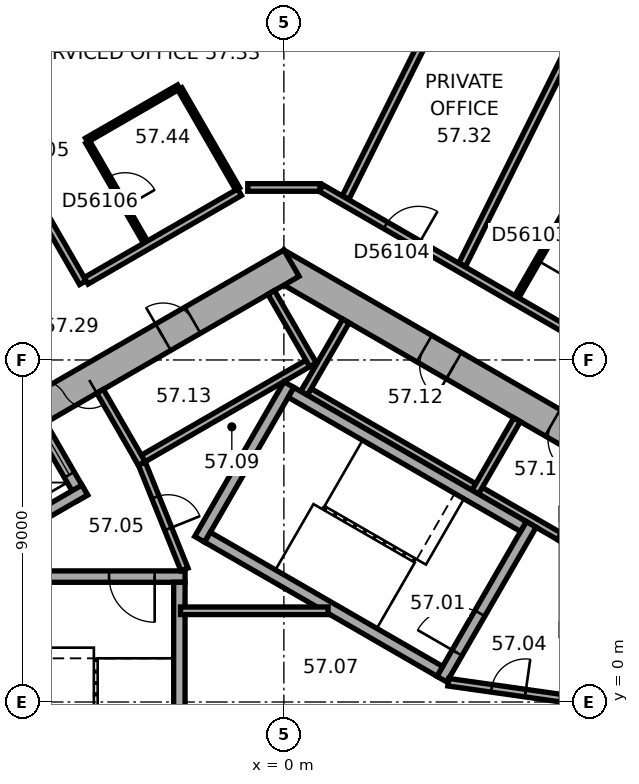
"""IFC4 building model, lengths in metres.
Left out: names, types, materials, properties, quantities, classifications, styles, units other than length and angle.
Written with IfcOpenShell. Run it as: python <this file> out.ifc"""

import sys

from ifc_helpers import new_model, si_unit, direction, frame, frame_2d, origin, place, context, subcontext, project, spatial, rectangle, extrude, element, fill, save


model = new_model("IFC4")
c1 = context("Model", 3, precision=1e-05, world=origin(), true_north=direction((0.0, 1.0)))
c2 = subcontext(c1, "Body", "Model", "MODEL_VIEW")
j1 = project(units=[si_unit("LENGTHUNIT", "METRE"), si_unit("PLANEANGLEUNIT", "RADIAN")], contexts=[c1])
p1 = place(None, origin())
s1 = spatial("IfcSite", under=j1, at=p1, CompositionType="ELEMENT")
p2 = place(p1, origin())
s2 = spatial("IfcBuilding", under=s1, at=p2, CompositionType="ELEMENT")
p3 = place(p2, frame((0.0, 0.0, 232.8)))
s3 = spatial("IfcBuildingStorey", under=s2, at=p3, CompositionType="ELEMENT", Elevation=232.8)
p4 = place(p3, frame((10.1, 5.6, 0.0), z_axis=(0.0, 0.0, 1.0), x_axis=(-0.866023897231, 0.500002609418, 0.0)))
e1 = element("IfcWall", 1, at=p4, inside=s3, PredefinedType="SHEAR", context=c2, shape_type="SweptSolid", body=[
    extrude(rectangle(XDim=11.894, YDim=0.8, at=frame_2d((5.947, 0.0))), origin(), (0.0, 0.0, 1.0), 3.7),
])
p5 = place(p4, frame((2.597, 0.0, 0.0)))
e2 = element("IfcOpeningElement", 2, at=p5, cuts=e1, PredefinedType="OPENING", context=c2, shape_type="SweptSolid", body=[
    extrude(rectangle(XDim=0.9, YDim=2.1, at=frame_2d((0.45, 1.05))), frame((0.0, 0.41, 0.0), z_axis=(0.0, -1.0, 0.0), x_axis=(1.0, 0.0, 0.0)), (0.0, 0.0, 1.0), 0.82),
])
p6 = place(p4, frame((6.497, 0.0, 0.0)))
e3 = element("IfcOpeningElement", 3, at=p6, cuts=e1, PredefinedType="OPENING", context=c2, shape_type="SweptSolid", body=[
    extrude(rectangle(XDim=0.9, YDim=2.1, at=frame_2d((0.45, 1.05))), frame((0.0, 0.41, 0.0), z_axis=(0.0, -1.0, 0.0), x_axis=(1.0, 0.0, 0.0)), (0.0, 0.0, 1.0), 0.82),
])
p7 = place(p3, frame((0.2, 11.547, 0.0), z_axis=(0.0, 0.0, 1.0), x_axis=(-0.866023897231, -0.500002609418, 0.0)))
e4 = element("IfcWall", 4, at=p7, inside=s3, PredefinedType="SHEAR", context=c2, shape_type="SweptSolid", body=[
    extrude(rectangle(XDim=11.894, YDim=0.8, at=frame_2d((5.947, 0.0))), origin(), (0.0, 0.0, 1.0), 3.7),
])
p8 = place(p7, frame((6.147, 0.0, 0.0)))
e5 = element("IfcOpeningElement", 5, at=p8, cuts=e4, PredefinedType="OPENING", context=c2, shape_type="SweptSolid", body=[
    extrude(rectangle(XDim=1.5, YDim=2.1, at=frame_2d((0.75, 1.05))), frame((0.0, 0.41, 0.0), z_axis=(0.0, -1.0, 0.0), x_axis=(1.0, 0.0, 0.0)), (0.0, 0.0, 1.0), 0.82),
])
p9 = place(p7, frame((2.997, 0.0, 0.0)))
e6 = element("IfcOpeningElement", 6, at=p9, cuts=e4, PredefinedType="OPENING", context=c2, shape_type="SweptSolid", body=[
    extrude(rectangle(XDim=0.9, YDim=2.1, at=frame_2d((0.45, 1.05))), frame((0.0, 0.41, 0.0), z_axis=(0.0, -1.0, 0.0), x_axis=(1.0, 0.0, 0.0)), (0.0, 0.0, 1.0), 0.82),
])
p10 = place(p3, frame((18.299, 13.727, 0.0), z_axis=(0.0, 0.0, 1.0), x_axis=(-0.894934554817, 0.44619742558, 0.0)))
e7 = element("IfcWall", 7, at=p10, inside=s3, PredefinedType="STANDARD", context=c2, shape_type="SweptSolid", body=[
    extrude(rectangle(XDim=18.841, YDim=0.2, at=frame_2d((9.421, 0.0))), origin(), (0.0, 0.0, 1.0), 3.7),
])
p11 = place(p10, frame((1.253, 0.0, 0.9)))
e8 = element("IfcOpeningElement", 8, at=p11, cuts=e7, PredefinedType="OPENING", context=c2, shape_type="SweptSolid", body=[
    extrude(rectangle(XDim=2.2, YDim=2.0, at=frame_2d((1.1, 1.0))), frame((0.0, 0.11, 0.0), z_axis=(0.0, -1.0, 0.0), x_axis=(1.0, 0.0, 0.0)), (0.0, 0.0, 1.0), 0.22),
])
p12 = place(p10, frame((4.786, 0.0, 0.9)))
e9 = element("IfcOpeningElement", 9, at=p12, cuts=e7, PredefinedType="OPENING", context=c2, shape_type="SweptSolid", body=[
    extrude(rectangle(XDim=2.2, YDim=2.0, at=frame_2d((1.1, 1.0))), frame((0.0, 0.11, 0.0), z_axis=(0.0, -1.0, 0.0), x_axis=(1.0, 0.0, 0.0)), (0.0, 0.0, 1.0), 0.22),
])
p13 = place(p10, frame((8.32, 0.0, 0.9)))
e10 = element("IfcOpeningElement", 10, at=p13, cuts=e7, PredefinedType="OPENING", context=c2, shape_type="SweptSolid", body=[
    extrude(rectangle(XDim=2.2, YDim=2.0, at=frame_2d((1.1, 1.0))), frame((0.0, 0.11, 0.0), z_axis=(0.0, -1.0, 0.0), x_axis=(1.0, 0.0, 0.0)), (0.0, 0.0, 1.0), 0.22),
])
p14 = place(p10, frame((11.854, 0.0, 0.9)))
e11 = element("IfcOpeningElement", 11, at=p14, cuts=e7, PredefinedType="OPENING", context=c2, shape_type="SweptSolid", body=[
    extrude(rectangle(XDim=2.2, YDim=2.0, at=frame_2d((1.1, 1.0))), frame((0.0, 0.11, 0.0), z_axis=(0.0, -1.0, 0.0), x_axis=(1.0, 0.0, 0.0)), (0.0, 0.0, 1.0), 0.22),
])
p15 = place(p10, frame((15.387, 0.0, 0.9)))
e12 = element("IfcOpeningElement", 12, at=p15, cuts=e7, PredefinedType="OPENING", context=c2, shape_type="SweptSolid", body=[
    extrude(rectangle(XDim=2.2, YDim=2.0, at=frame_2d((1.1, 1.0))), frame((0.0, 0.11, 0.0), z_axis=(0.0, -1.0, 0.0), x_axis=(1.0, 0.0, 0.0)), (0.0, 0.0, 1.0), 0.22),
])
p16 = place(p3, frame((-2.786, 22.005, 0.0), z_axis=(0.0, 0.0, 1.0), x_axis=(-0.866026555358, -0.49999800541, 0.0)))
e13 = element("IfcWall", 13, at=p16, inside=s3, PredefinedType="STANDARD", context=c2, shape_type="SweptSolid", body=[
    extrude(rectangle(XDim=18.841, YDim=0.2, at=frame_2d((9.421, 0.0))), origin(), (0.0, 0.0, 1.0), 3.7),
])
p17 = place(p16, frame((1.254, 0.0, 0.9)))
e14 = element("IfcOpeningElement", 14, at=p17, cuts=e13, PredefinedType="OPENING", context=c2, shape_type="SweptSolid", body=[
    extrude(rectangle(XDim=2.2, YDim=2.0, at=frame_2d((1.1, 1.0))), frame((0.0, 0.11, 0.0), z_axis=(0.0, -1.0, 0.0), x_axis=(1.0, 0.0, 0.0)), (0.0, 0.0, 1.0), 0.22),
])
p18 = place(p16, frame((4.788, 0.0, 0.9)))
e15 = element("IfcOpeningElement", 15, at=p18, cuts=e13, PredefinedType="OPENING", context=c2, shape_type="SweptSolid", body=[
    extrude(rectangle(XDim=2.2, YDim=2.0, at=frame_2d((1.1, 1.0))), frame((0.0, 0.11, 0.0), z_axis=(0.0, -1.0, 0.0), x_axis=(1.0, 0.0, 0.0)), (0.0, 0.0, 1.0), 0.22),
])
p19 = place(p16, frame((8.321, 0.0, 0.9)))
e16 = element("IfcOpeningElement", 16, at=p19, cuts=e13, PredefinedType="OPENING", context=c2, shape_type="SweptSolid", body=[
    extrude(rectangle(XDim=2.2, YDim=2.0, at=frame_2d((1.1, 1.0))), frame((0.0, 0.11, 0.0), z_axis=(0.0, -1.0, 0.0), x_axis=(1.0, 0.0, 0.0)), (0.0, 0.0, 1.0), 0.22),
])
p20 = place(p16, frame((11.855, 0.0, 0.9)))
e17 = element("IfcOpeningElement", 17, at=p20, cuts=e13, PredefinedType="OPENING", context=c2, shape_type="SweptSolid", body=[
    extrude(rectangle(XDim=2.2, YDim=2.0, at=frame_2d((1.1, 1.0))), frame((0.0, 0.11, 0.0), z_axis=(0.0, -1.0, 0.0), x_axis=(1.0, 0.0, 0.0)), (0.0, 0.0, 1.0), 0.22),
])
p21 = place(p16, frame((15.389, 0.0, 0.9)))
e18 = element("IfcOpeningElement", 18, at=p21, cuts=e13, PredefinedType="OPENING", context=c2, shape_type="SweptSolid", body=[
    extrude(rectangle(XDim=2.2, YDim=2.0, at=frame_2d((1.1, 1.0))), frame((0.0, 0.11, 0.0), z_axis=(0.0, -1.0, 0.0), x_axis=(1.0, 0.0, 0.0)), (0.0, 0.0, 1.0), 0.22),
])
p22 = place(p3, frame((7.424, 4.259, 0.0), z_axis=(0.0, 0.0, 1.0), x_axis=(-0.866026010844, 0.49999894854, 0.0)))
e19 = element("IfcWall", 19, at=p22, inside=s3, PredefinedType="PARTITIONING", context=c2, shape_type="SweptSolid", body=[
    extrude(rectangle(XDim=8.0, YDim=0.2, at=frame_2d((4.0, 0.0))), origin(), (0.0, 0.0, 1.0), 3.42),
])
for number, where, z_axis, x_axis in (
    (20, (7.287, 4.222, 0.0), (0.0, 0.0, 1.0), (0.5, 0.866, 0.0)),
    (21, (5.036, 5.522, 0.0), (0.0, 0.0, 1.0), (0.5, 0.866, 0.0)),
    (22, (0.532, 8.122, 0.0), (0.0, 0.0, 1.0), (0.5, 0.866, 0.0)),
):
    element("IfcWall", number, at=place(p3, frame(where, z_axis=z_axis, x_axis=x_axis)), inside=s3, PredefinedType="PARTITIONING", context=c2, shape_type="SweptSolid", body=[
        extrude(rectangle(XDim=2.2, YDim=0.2, at=frame_2d((1.1, 0.0))), origin(), (0.0, 0.0, 1.0), 3.42),
    ])
p23 = place(p3, frame((0.803, 9.009, 0.0), z_axis=(0.0, 0.0, 1.0), x_axis=(-0.866028230842, -0.499995103361, 0.0)))
e23 = element("IfcWall", 23, at=p23, inside=s3, PredefinedType="PARTITIONING", context=c2, shape_type="SweptSolid", body=[
    extrude(rectangle(XDim=5.4, YDim=0.2, at=frame_2d((2.7, 0.0))), origin(), (0.0, 0.0, 1.0), 3.42),
])
p24 = place(p3, frame((0.767, 8.872, 0.0), z_axis=(0.0, 0.0, 1.0), x_axis=(-0.499994660107, 0.866028486751, 0.0)))
e24 = element("IfcWall", 24, at=p24, inside=s3, PredefinedType="PARTITIONING", context=c2, shape_type="SweptSolid", body=[
    extrude(rectangle(XDim=2.2, YDim=0.2, at=frame_2d((1.1, 0.0))), origin(), (0.0, 0.0, 1.0), 3.42),
])
p25 = place(p3, frame((-3.737, 6.272, 0.0), z_axis=(0.0, 0.0, 1.0), x_axis=(-0.50002983664, 0.866008176907, 0.0)))
e25 = element("IfcWall", 25, at=p25, inside=s3, PredefinedType="PARTITIONING", context=c2, shape_type="SweptSolid", body=[
    extrude(rectangle(XDim=2.2, YDim=0.2, at=frame_2d((1.1, 0.0))), origin(), (0.0, 0.0, 1.0), 3.42),
])
p26 = place(p3, frame((4.158, 0.602, 0.0), z_axis=(0.0, 0.0, 1.0), x_axis=(0.499977259774, 0.866038532462, 0.0)))
e26 = element("IfcWall", 26, at=p26, inside=s3, PredefinedType="SHEAR", context=c2, shape_type="SweptSolid", body=[
    extrude(rectangle(XDim=4.7, YDim=0.3, at=frame_2d((2.35, 0.0))), origin(), (0.0, 0.0, 1.0), 3.42),
])
p27 = place(p26, frame((0.8, 0.0, 0.0)))
e27 = element("IfcOpeningElement", 27, at=p27, cuts=e26, PredefinedType="OPENING", context=c2, shape_type="SweptSolid", body=[
    extrude(rectangle(XDim=1.2, YDim=2.1, at=frame_2d((0.6, 1.05))), frame((0.0, 0.16, 0.0), z_axis=(0.0, -1.0, 0.0), x_axis=(1.0, 0.0, 0.0)), (0.0, 0.0, 1.0), 0.32),
])
p28 = place(p3, frame((-2.216, 4.282, 0.0), z_axis=(0.0, 0.0, 1.0), x_axis=(0.499977259774, 0.866038532462, 0.0)))
e28 = element("IfcWall", 28, at=p28, inside=s3, PredefinedType="SHEAR", context=c2, shape_type="SweptSolid", body=[
    extrude(rectangle(XDim=4.7, YDim=0.3, at=frame_2d((2.35, 0.0))), origin(), (0.0, 0.0, 1.0), 3.42),
])
for number, where, z_axis, x_axis in (
    (29, (4.103, 0.807, 0.0), (0.0, 0.0, 1.0), (-0.866, 0.5, 0.0)),
    (30, (6.303, 4.617, 0.0), (0.0, 0.0, 1.0), (-0.866, 0.5, 0.0)),
):
    element("IfcWall", number, at=place(p3, frame(where, z_axis=z_axis, x_axis=x_axis)), inside=s3, PredefinedType="SHEAR", context=c2, shape_type="SweptSolid", body=[
        extrude(rectangle(XDim=7.06, YDim=0.3, at=frame_2d((3.53, 0.0))), origin(), (0.0, 0.0, 1.0), 3.42),
    ])
p29 = place(p3, frame((-2.6, 3.3, 0.0), z_axis=(0.0, 0.0, 1.0), x_axis=(-1.0, 0.0, 0.0)))
e31 = element("IfcWall", 31, at=p29, inside=s3, PredefinedType="SHEAR", context=c2, shape_type="SweptSolid", body=[
    extrude(rectangle(XDim=4.7, YDim=0.3, at=frame_2d((2.35, 0.0))), origin(), (0.0, 0.0, 1.0), 3.42),
])
p30 = place(p29, frame((0.8, 0.0, 0.0)))
e32 = element("IfcOpeningElement", 32, at=p30, cuts=e31, PredefinedType="OPENING", context=c2, shape_type="SweptSolid", body=[
    extrude(rectangle(XDim=1.2, YDim=2.1, at=frame_2d((0.6, 1.05))), frame((0.0, 0.16, 0.0), z_axis=(0.0, -1.0, 0.0), x_axis=(1.0, 0.0, 0.0)), (0.0, 0.0, 1.0), 0.32),
])
p31 = place(p3, frame((-2.75, 3.15, 0.0), z_axis=(0.0, 0.0, 1.0), x_axis=(0.0, -1.0, 0.0)))
e33 = element("IfcWall", 33, at=p31, inside=s3, PredefinedType="SHEAR", context=c2, shape_type="SweptSolid", body=[
    extrude(rectangle(XDim=7.06, YDim=0.3, at=frame_2d((3.53, 0.0))), origin(), (0.0, 0.0, 1.0), 3.42),
])
p32 = place(p3, frame((4.327, 0.521, 0.0), z_axis=(0.0, 0.0, 1.0), x_axis=(0.990124376366, -0.14019172346, 0.0)))
e34 = element("IfcWall", 34, at=p32, inside=s3, PredefinedType="PARTITIONING", context=c2, shape_type="SweptSolid", body=[
    extrude(rectangle(XDim=3.002, YDim=0.2, at=frame_2d((1.501, 0.0))), origin(), (0.0, 0.0, 1.0), 3.42),
])
p33 = place(p32, frame((1.15, 0.0, 0.0)))
e35 = element("IfcOpeningElement", 35, at=p33, cuts=e34, PredefinedType="OPENING", context=c2, shape_type="SweptSolid", body=[
    extrude(rectangle(XDim=0.9, YDim=2.1, at=frame_2d((0.45, 1.05))), frame((0.0, 0.11, 0.0), z_axis=(0.0, -1.0, 0.0), x_axis=(1.0, 0.0, 0.0)), (0.0, 0.0, 1.0), 0.22),
])
p34 = place(p3, frame((-5.295, 5.372, 0.0), z_axis=(0.0, 0.0, 1.0), x_axis=(-0.500077893725, 0.86598042715, 0.0)))
e36 = element("IfcWall", 36, at=p34, inside=s3, PredefinedType="SHEAR", context=c2, shape_type="SweptSolid", body=[
    extrude(rectangle(XDim=2.2, YDim=0.3, at=frame_2d((1.1, 0.0))), origin(), (0.0, 0.0, 1.0), 3.42),
])
p35 = place(p34, frame((0.7, 0.0, 0.0)))
e37 = element("IfcOpeningElement", 37, at=p35, cuts=e36, PredefinedType="OPENING", context=c2, shape_type="SweptSolid", body=[
    extrude(rectangle(XDim=1.1, YDim=2.1, at=frame_2d((0.55, 1.05))), frame((0.0, 0.16, 0.0), z_axis=(0.0, -1.0, 0.0), x_axis=(1.0, 0.0, 0.0)), (0.0, 0.0, 1.0), 0.32),
])
p36 = place(p3, frame((-5.24, 5.577, 0.0), z_axis=(0.0, 0.0, 1.0), x_axis=(-0.866014461049, -0.500018952895, 0.0)))
e38 = element("IfcWall", 38, at=p36, inside=s3, PredefinedType="SHEAR", context=c2, shape_type="SweptSolid", body=[
    extrude(rectangle(XDim=3.35, YDim=0.3, at=frame_2d((1.675, 0.0))), origin(), (0.0, 0.0, 1.0), 3.42),
])
p37 = place(p3, frame((-2.615, 3.487, 0.0), z_axis=(0.0, 0.0, 1.0), x_axis=(-0.373576831041, 0.92759924068, 0.0)))
e39 = element("IfcWall", 39, at=p37, inside=s3, PredefinedType="PARTITIONING", context=c2, shape_type="SweptSolid", body=[
    extrude(rectangle(XDim=3.002, YDim=0.2, at=frame_2d((1.501, 0.0))), origin(), (0.0, 0.0, 1.0), 3.42),
])
p38 = place(p37, frame((1.15, 0.0, 0.0)))
e40 = element("IfcOpeningElement", 40, at=p38, cuts=e39, PredefinedType="OPENING", context=c2, shape_type="SweptSolid", body=[
    extrude(rectangle(XDim=0.9, YDim=2.1, at=frame_2d((0.45, 1.05))), frame((0.0, 0.11, 0.0), z_axis=(0.0, -1.0, 0.0), x_axis=(1.0, 0.0, 0.0)), (0.0, 0.0, 1.0), 0.22),
])
p39 = place(p3, frame((-2.72, 2.4, 0.0), z_axis=(0.0, 0.0, 1.0), x_axis=(1.0, 0.0, 0.0)))
e41 = element("IfcWall", 41, at=p39, inside=s3, PredefinedType="PARTITIONING", context=c2, shape_type="SweptSolid", body=[
    extrude(rectangle(XDim=3.883, YDim=0.2, at=frame_2d((1.941, 0.0))), origin(), (0.0, 0.0, 1.0), 3.42),
])
p40 = place(p3, frame((-8.965, 17.399, 0.0), z_axis=(0.0, 0.0, 1.0), x_axis=(0.499993683172, -0.866029050776, 0.0)))
e42 = element("IfcWall", 42, at=p40, inside=s3, PredefinedType="PARTITIONING", context=c2, shape_type="SweptSolid", body=[
    extrude(rectangle(XDim=7.35, YDim=0.2, at=frame_2d((3.675, 0.0))), origin(), (0.0, 0.0, 1.0), 2.87),
])
p41 = place(p40, frame((3.175, 0.0, 0.0)))
e43 = element("IfcOpeningElement", 43, at=p41, cuts=e42, PredefinedType="OPENING", context=c2, shape_type="SweptSolid", body=[
    extrude(rectangle(XDim=1.0, YDim=2.1, at=frame_2d((0.5, 1.05))), frame((0.0, 0.11, 0.0), z_axis=(0.0, -1.0, 0.0), x_axis=(1.0, 0.0, 0.0)), (0.0, 0.0, 1.0), 0.22),
])
p42 = place(p3, frame((-5.191, 14.785, 0.0), z_axis=(0.0, 0.0, 1.0), x_axis=(0.866034573852, 0.49998411664, 0.0)))
e44 = element("IfcWall", 44, at=p42, inside=s3, PredefinedType="PARTITIONING", context=c2, shape_type="SweptSolid", body=[
    extrude(rectangle(XDim=2.8, YDim=0.12, at=frame_2d((1.4, 0.0))), origin(), (0.0, 0.0, 1.0), 3.42),
])
p43 = place(p3, frame((-3.641, 12.101, 0.0), z_axis=(0.0, 0.0, 1.0), x_axis=(-0.500026023896, 0.86601037836, 0.0)))
e45 = element("IfcWall", 45, at=p43, inside=s3, PredefinedType="PARTITIONING", context=c2, shape_type="SweptSolid", body=[
    extrude(rectangle(XDim=3.04, YDim=0.12, at=frame_2d((1.52, 0.0))), origin(), (0.0, 0.0, 1.0), 3.42),
])
p44 = place(p43, frame((1.07, 0.0, 0.0)))
e46 = element("IfcOpeningElement", 46, at=p44, cuts=e45, PredefinedType="OPENING", context=c2, shape_type="SweptSolid", body=[
    extrude(rectangle(XDim=0.9, YDim=2.1, at=frame_2d((0.45, 1.05))), frame((0.0, 0.07, 0.0), z_axis=(0.0, -1.0, 0.0), x_axis=(1.0, 0.0, 0.0)), (0.0, 0.0, 1.0), 0.14),
])
p45 = place(p3, frame((-2.737, 16.133, 0.0), z_axis=(0.0, 0.0, 1.0), x_axis=(0.500026023896, -0.86601037836, 0.0)))
e47 = element("IfcWall", 47, at=p45, inside=s3, PredefinedType="PARTITIONING", context=c2, shape_type="SweptSolid", body=[
    extrude(rectangle(XDim=3.04, YDim=0.12, at=frame_2d((1.52, 0.0))), origin(), (0.0, 0.0, 1.0), 3.42),
])
p46 = place(p3, frame((-1.167, 13.414, 0.0), z_axis=(0.0, 0.0, 1.0), x_axis=(-0.866023347809, -0.500003561037, 0.0)))
e48 = element("IfcWall", 48, at=p46, inside=s3, PredefinedType="PARTITIONING", context=c2, shape_type="SweptSolid", body=[
    extrude(rectangle(XDim=4.661, YDim=0.2, at=frame_2d((2.331, 0.0))), origin(), (0.0, 0.0, 1.0), 3.42),
])
p47 = place(p3, frame((0.95, 13.539, 0.0), z_axis=(0.0, 0.0, 1.0), x_axis=(-1.0, 0.0, 0.0)))
e49 = element("IfcWall", 49, at=p47, inside=s3, PredefinedType="PARTITIONING", context=c2, shape_type="SweptSolid", body=[
    extrude(rectangle(XDim=1.9, YDim=0.2, at=frame_2d((0.95, 0.0))), origin(), (0.0, 0.0, 1.0), 3.42),
])
p48 = place(p3, frame((4.723, 19.49, 0.0), z_axis=(0.0, 0.0, 1.0), x_axis=(-0.446186614574, -0.894939944898, 0.0)))
e50 = element("IfcWall", 50, at=p48, inside=s3, PredefinedType="PARTITIONING", context=c2, shape_type="SweptSolid", body=[
    extrude(rectangle(XDim=6.944, YDim=0.2, at=frame_2d((3.472, 0.0))), origin(), (0.0, 0.0, 1.0), 2.87),
])
p49 = place(p3, frame((6.13, 10.664, 0.0), z_axis=(0.0, 0.0, 1.0), x_axis=(0.499967891604, 0.866043940782, 0.0)))
e51 = element("IfcWall", 51, at=p49, inside=s3, PredefinedType="PARTITIONING", context=c2, shape_type="SweptSolid", body=[
    extrude(rectangle(XDim=3.1, YDim=0.12, at=frame_2d((1.55, 0.0))), origin(), (0.0, 0.0, 1.0), 3.42),
])
p50 = place(p49, frame((1.1, 0.0, 0.0)))
e52 = element("IfcOpeningElement", 52, at=p50, cuts=e51, PredefinedType="OPENING", context=c2, shape_type="SweptSolid", body=[
    extrude(rectangle(XDim=0.9, YDim=2.1, at=frame_2d((0.45, 1.05))), frame((0.0, 0.07, 0.0), z_axis=(0.0, -1.0, 0.0), x_axis=(1.0, 0.0, 0.0)), (0.0, 0.0, 1.0), 0.14),
])
p51 = place(p3, frame((7.886, 17.913, 0.0), z_axis=(0.0, 0.0, 1.0), x_axis=(-0.446204015428, -0.894931269213, 0.0)))
e53 = element("IfcWall", 53, at=p51, inside=s3, PredefinedType="PARTITIONING", context=c2, shape_type="SweptSolid", body=[
    extrude(rectangle(XDim=7.16, YDim=0.2, at=frame_2d((3.58, 0.0))), origin(), (0.0, 0.0, 1.0), 3.42),
])
p52 = place(p3, frame((8.505, 9.177, 0.0), z_axis=(0.0, 0.0, 1.0), x_axis=(-0.866019839902, 0.500009636803, 0.0)))
e54 = element("IfcWall", 54, at=p52, inside=s3, PredefinedType="PARTITIONING", context=c2, shape_type="SweptSolid", body=[
    extrude(rectangle(XDim=8.683, YDim=0.2, at=frame_2d((4.342, 0.0))), origin(), (0.0, 0.0, 1.0), 3.42),
])
p53 = place(p52, frame((5.73, 0.0, 0.0)))
e55 = element("IfcOpeningElement", 55, at=p53, cuts=e54, PredefinedType="OPENING", context=c2, shape_type="SweptSolid", body=[
    extrude(rectangle(XDim=1.0, YDim=2.1, at=frame_2d((0.5, 1.05))), frame((0.0, 0.11, 0.0), z_axis=(0.0, -1.0, 0.0), x_axis=(1.0, 0.0, 0.0)), (0.0, 0.0, 1.0), 0.22),
])
p54 = place(p8, origin())
e56 = element("IfcDoor", 56, at=p54, inside=s3, OperationType="DOUBLE_DOOR_SINGLE_SWING", PredefinedType="DOOR", context=c2, shape_type="SweptSolid", body=[
    extrude(rectangle(XDim=1.5, YDim=2.1, at=frame_2d((0.75, 1.05))), frame((0.0, 0.025, 0.0), z_axis=(0.0, -1.0, 0.0), x_axis=(1.0, 0.0, 0.0)), (0.0, 0.0, 1.0), 0.05),
])
fill(e5, e56)
p55 = place(p27, origin())
e57 = element("IfcDoor", 57, at=p55, inside=s3, OperationType="SINGLE_SWING_RIGHT", PredefinedType="DOOR", context=c2, shape_type="SweptSolid", body=[
    extrude(rectangle(XDim=1.2, YDim=2.1, at=frame_2d((0.6, 1.05))), frame((0.0, 0.025, 0.0), z_axis=(0.0, -1.0, 0.0), x_axis=(1.0, 0.0, 0.0)), (0.0, 0.0, 1.0), 0.05),
])
fill(e27, e57)
p56 = place(p30, origin())
e58 = element("IfcDoor", 58, at=p56, inside=s3, OperationType="SINGLE_SWING_RIGHT", PredefinedType="DOOR", context=c2, shape_type="SweptSolid", body=[
    extrude(rectangle(XDim=1.2, YDim=2.1, at=frame_2d((0.6, 1.05))), frame((0.0, 0.025, 0.0), z_axis=(0.0, -1.0, 0.0), x_axis=(1.0, 0.0, 0.0)), (0.0, 0.0, 1.0), 0.05),
])
fill(e32, e58)
p57 = place(p33, origin())
e59 = element("IfcDoor", 59, at=p57, inside=s3, OperationType="SINGLE_SWING_LEFT", PredefinedType="DOOR", context=c2, shape_type="SweptSolid", body=[
    extrude(rectangle(XDim=0.9, YDim=2.1, at=frame_2d((0.45, 1.05))), frame((0.0, 0.025, 0.0), z_axis=(0.0, -1.0, 0.0), x_axis=(1.0, 0.0, 0.0)), (0.0, 0.0, 1.0), 0.05),
])
fill(e35, e59)
p58 = place(p38, origin())
e60 = element("IfcDoor", 60, at=p58, inside=s3, OperationType="SINGLE_SWING_LEFT", PredefinedType="DOOR", context=c2, shape_type="SweptSolid", body=[
    extrude(rectangle(XDim=0.9, YDim=2.1, at=frame_2d((0.45, 1.05))), frame((0.0, 0.025, 0.0), z_axis=(0.0, -1.0, 0.0), x_axis=(1.0, 0.0, 0.0)), (0.0, 0.0, 1.0), 0.05),
])
fill(e40, e60)
p59 = place(p5, origin())
e61 = element("IfcDoor", 61, at=p59, inside=s3, OperationType="SINGLE_SWING_LEFT", PredefinedType="DOOR", context=c2, shape_type="SweptSolid", body=[
    extrude(rectangle(XDim=0.9, YDim=2.1, at=frame_2d((0.45, 1.05))), frame((0.0, 0.025, 0.0), z_axis=(0.0, -1.0, 0.0), x_axis=(1.0, 0.0, 0.0)), (0.0, 0.0, 1.0), 0.05),
])
fill(e2, e61)
p60 = place(p6, origin())
e62 = element("IfcDoor", 62, at=p60, inside=s3, OperationType="SINGLE_SWING_LEFT", PredefinedType="DOOR", context=c2, shape_type="SweptSolid", body=[
    extrude(rectangle(XDim=0.9, YDim=2.1, at=frame_2d((0.45, 1.05))), frame((0.0, 0.025, 0.0), z_axis=(0.0, -1.0, 0.0), x_axis=(1.0, 0.0, 0.0)), (0.0, 0.0, 1.0), 0.05),
])
fill(e3, e62)
p61 = place(p9, origin())
e63 = element("IfcDoor", 63, at=p61, inside=s3, OperationType="SINGLE_SWING_LEFT", PredefinedType="DOOR", context=c2, shape_type="SweptSolid", body=[
    extrude(rectangle(XDim=0.9, YDim=2.1, at=frame_2d((0.45, 1.05))), frame((0.0, 0.025, 0.0), z_axis=(0.0, -1.0, 0.0), x_axis=(1.0, 0.0, 0.0)), (0.0, 0.0, 1.0), 0.05),
])
fill(e6, e63)
p62 = place(p35, origin())
e64 = element("IfcDoor", 64, at=p62, inside=s3, OperationType="DOUBLE_DOOR_SLIDING", PredefinedType="DOOR", context=c2, shape_type="SweptSolid", body=[
    extrude(rectangle(XDim=1.1, YDim=2.1, at=frame_2d((0.55, 1.05))), frame((0.0, 0.025, 0.0), z_axis=(0.0, -1.0, 0.0), x_axis=(1.0, 0.0, 0.0)), (0.0, 0.0, 1.0), 0.05),
])
fill(e37, e64)
p63 = place(p50, origin())
e65 = element("IfcDoor", 65, at=p63, inside=s3, OperationType="SINGLE_SWING_LEFT", PredefinedType="DOOR", context=c2, shape_type="SweptSolid", body=[
    extrude(rectangle(XDim=0.9, YDim=2.1, at=frame_2d((0.45, 1.05))), frame((0.0, 0.025, 0.0), z_axis=(0.0, -1.0, 0.0), x_axis=(1.0, 0.0, 0.0)), (0.0, 0.0, 1.0), 0.05),
])
fill(e52, e65)
p64 = place(p53, origin())
e66 = element("IfcDoor", 66, at=p64, inside=s3, OperationType="SINGLE_SWING_LEFT", PredefinedType="DOOR", context=c2, shape_type="SweptSolid", body=[
    extrude(rectangle(XDim=1.0, YDim=2.1, at=frame_2d((0.5, 1.05))), frame((0.0, 0.025, 0.0), z_axis=(0.0, -1.0, 0.0), x_axis=(1.0, 0.0, 0.0)), (0.0, 0.0, 1.0), 0.05),
])
fill(e55, e66)
p65 = place(p44, origin())
e67 = element("IfcDoor", 67, at=p65, inside=s3, OperationType="SINGLE_SWING_LEFT", PredefinedType="DOOR", context=c2, shape_type="SweptSolid", body=[
    extrude(rectangle(XDim=0.9, YDim=2.1, at=frame_2d((0.45, 1.05))), frame((0.0, 0.025, 0.0), z_axis=(0.0, -1.0, 0.0), x_axis=(1.0, 0.0, 0.0)), (0.0, 0.0, 1.0), 0.05),
])
fill(e46, e67)
save(model, sys.argv[1])
